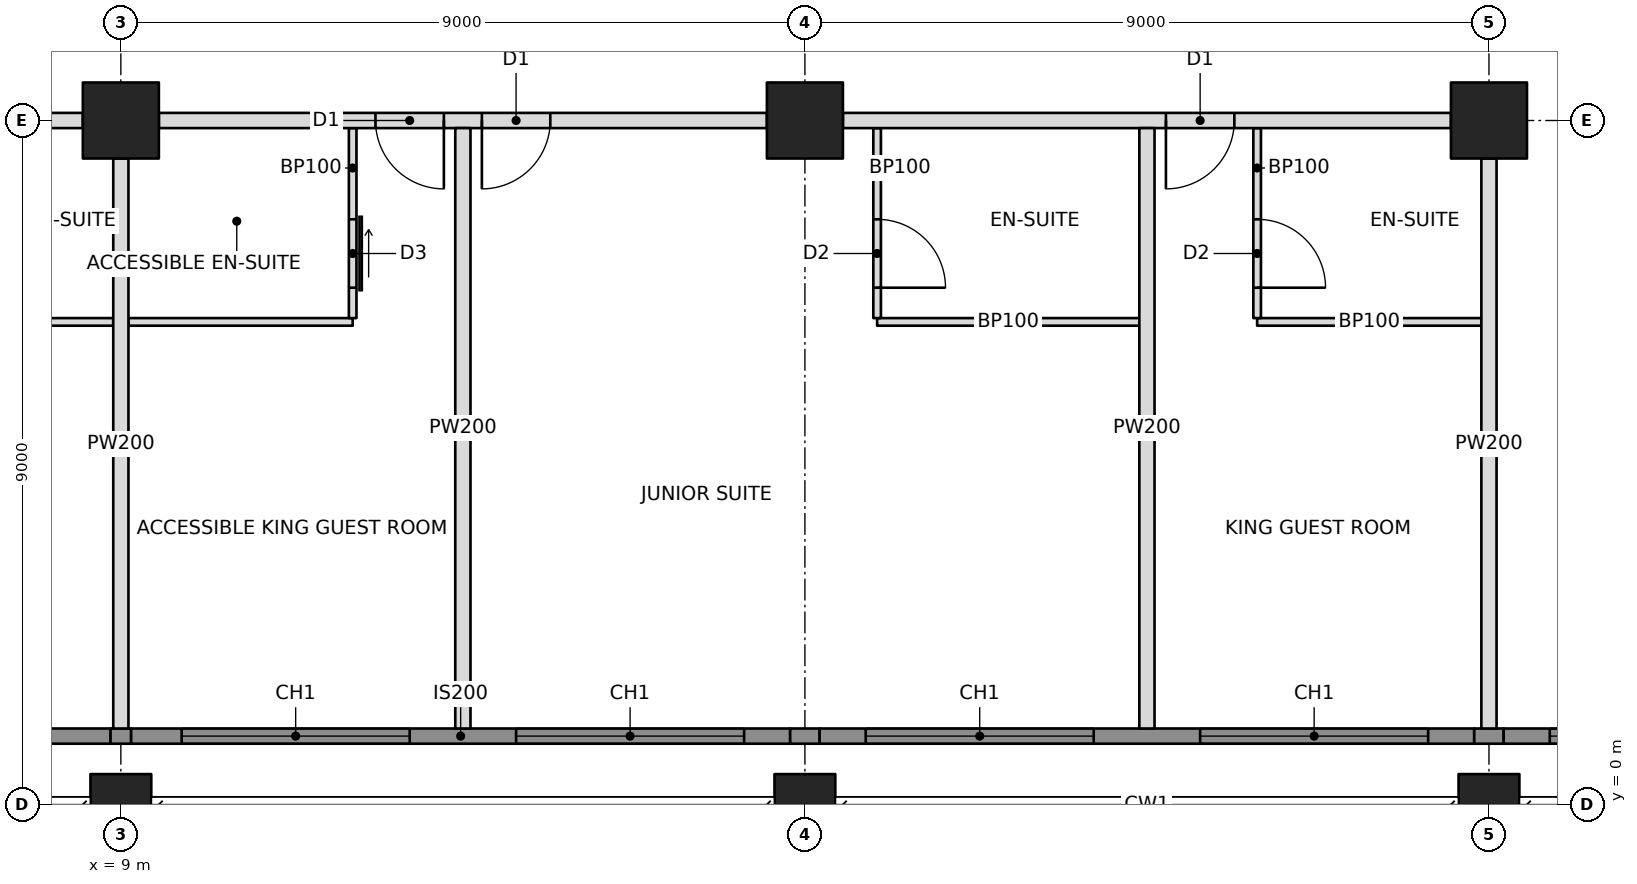
"""IFC4 building model, lengths in metres.
Left out: names, types, materials, properties, quantities, classifications, styles, units other than length and angle.
Written with IfcOpenShell. Run it as: python <this file> out.ifc"""

import sys

from ifc_helpers import new_model, si_unit, direction, frame, frame_2d, origin, origin_2d, place, context, subcontext, project, spatial, rectangle, hollow_rectangle, extrude, element, fill, save


model = new_model("IFC4")
c1 = context("Model", 3, precision=1e-05, world=origin(), true_north=direction((0.0, 1.0)))
c2 = subcontext(c1, "Body", "Model", "MODEL_VIEW")
j1 = project(units=[si_unit("LENGTHUNIT", "METRE"), si_unit("PLANEANGLEUNIT", "RADIAN")], contexts=[c1])
p1 = place(None, origin())
s1 = spatial("IfcSite", under=j1, at=p1, CompositionType="ELEMENT")
p2 = place(p1, origin())
s2 = spatial("IfcBuilding", under=s1, at=p2, CompositionType="ELEMENT")
p3 = place(p2, frame((0.0, 0.0, 97.6)))
s3 = spatial("IfcBuildingStorey", under=s2, at=p3, CompositionType="ELEMENT", Elevation=97.6)
p4 = place(p3, frame((9.0, 0.0, 0.0), z_axis=(0.0, 0.0, 1.0), x_axis=(1.0, 0.0, 0.0)))
e1 = element("IfcColumn", 1, at=p4, inside=s3, PredefinedType="COLUMN", context=c2, shape_type="SweptSolid", body=[
    extrude(hollow_rectangle(XDim=0.8, YDim=0.8, WallThickness=0.07, at=origin_2d()), origin(), (0.0, 0.0, 1.0), 3.4),
])
p5 = place(p3, frame((9.0, 9.0, 0.0), z_axis=(0.0, 0.0, 1.0), x_axis=(1.0, 0.0, 0.0)))
e2 = element("IfcColumn", 2, at=p5, inside=s3, PredefinedType="COLUMN", context=c2, shape_type="SweptSolid", body=[
    extrude(hollow_rectangle(XDim=1.0, YDim=1.0, WallThickness=0.1, at=origin_2d()), origin(), (0.0, 0.0, 1.0), 3.4),
])
p6 = place(p3, frame((18.0, 0.0, 0.0), z_axis=(0.0, 0.0, 1.0), x_axis=(1.0, 0.0, 0.0)))
e3 = element("IfcColumn", 3, at=p6, inside=s3, PredefinedType="COLUMN", context=c2, shape_type="SweptSolid", body=[
    extrude(hollow_rectangle(XDim=0.8, YDim=0.8, WallThickness=0.07, at=origin_2d()), origin(), (0.0, 0.0, 1.0), 3.4),
])
p7 = place(p3, frame((18.0, 9.0, 0.0), z_axis=(0.0, 0.0, 1.0), x_axis=(1.0, 0.0, 0.0)))
e4 = element("IfcColumn", 4, at=p7, inside=s3, PredefinedType="COLUMN", context=c2, shape_type="SweptSolid", body=[
    extrude(hollow_rectangle(XDim=1.0, YDim=1.0, WallThickness=0.1, at=origin_2d()), origin(), (0.0, 0.0, 1.0), 3.4),
])
p8 = place(p3, frame((27.0, 0.0, 0.0), z_axis=(0.0, 0.0, 1.0), x_axis=(1.0, 0.0, 0.0)))
e5 = element("IfcColumn", 5, at=p8, inside=s3, PredefinedType="COLUMN", context=c2, shape_type="SweptSolid", body=[
    extrude(hollow_rectangle(XDim=0.8, YDim=0.8, WallThickness=0.07, at=origin_2d()), origin(), (0.0, 0.0, 1.0), 3.4),
])
p9 = place(p3, frame((27.0, 9.0, 0.0), z_axis=(0.0, 0.0, 1.0), x_axis=(1.0, 0.0, 0.0)))
e6 = element("IfcColumn", 6, at=p9, inside=s3, PredefinedType="COLUMN", context=c2, shape_type="SweptSolid", body=[
    extrude(hollow_rectangle(XDim=1.0, YDim=1.0, WallThickness=0.1, at=origin_2d()), origin(), (0.0, 0.0, 1.0), 3.4),
])
p10 = place(p3, frame((3.0, 0.9, 0.0), z_axis=(0.0, 0.0, 1.0), x_axis=(1.0, 0.0, 0.0)))
e7 = element("IfcWall", 7, at=p10, inside=s3, PredefinedType="SOLIDWALL", context=c2, shape_type="SweptSolid", body=[
    extrude(rectangle(XDim=5.865, YDim=0.2, at=frame_2d((2.932, 0.0))), origin(), (0.0, 0.0, 1.0), 3.2),
])
p11 = place(p10, frame((1.45, 0.0, 0.6)))
e8 = element("IfcOpeningElement", 8, at=p11, cuts=e7, PredefinedType="OPENING", context=c2, shape_type="SweptSolid", body=[
    extrude(rectangle(XDim=3.0, YDim=2.2, at=frame_2d((1.5, 1.1))), frame((0.0, 0.11, 0.0), z_axis=(0.0, -1.0, 0.0), x_axis=(1.0, 0.0, 0.0)), (0.0, 0.0, 1.0), 0.22),
])
p12 = place(p3, frame((1.0, 9.0, 0.0), z_axis=(0.0, 0.0, 1.0), x_axis=(1.0, 0.0, 0.0)))
e9 = element("IfcWall", 9, at=p12, inside=s3, PredefinedType="PARTITIONING", context=c2, shape_type="SweptSolid", body=[
    extrude(rectangle(XDim=7.5, YDim=0.2, at=frame_2d((3.75, 0.0))), origin(), (0.0, 0.0, 1.0), 2.438),
])
p13 = place(p12, frame((0.25, 0.0, 0.0)))
e10 = element("IfcOpeningElement", 10, at=p13, cuts=e9, PredefinedType="OPENING", context=c2, shape_type="SweptSolid", body=[
    extrude(rectangle(XDim=0.9, YDim=2.1, at=frame_2d((0.45, 1.05))), frame((0.0, 0.11, 0.0), z_axis=(0.0, -1.0, 0.0), x_axis=(1.0, 0.0, 0.0)), (0.0, 0.0, 1.0), 0.22),
])
p14 = place(p3, frame((9.5, 9.0, 0.0), z_axis=(0.0, 0.0, 1.0), x_axis=(1.0, 0.0, 0.0)))
e11 = element("IfcWall", 11, at=p14, inside=s3, PredefinedType="PARTITIONING", context=c2, shape_type="SweptSolid", body=[
    extrude(rectangle(XDim=8.0, YDim=0.2, at=frame_2d((4.0, 0.0))), origin(), (0.0, 0.0, 1.0), 2.405),
])
p15 = place(p14, frame((2.85, 0.0, 0.0)))
e12 = element("IfcOpeningElement", 12, at=p15, cuts=e11, PredefinedType="OPENING", context=c2, shape_type="SweptSolid", body=[
    extrude(rectangle(XDim=0.9, YDim=2.1, at=frame_2d((0.45, 1.05))), frame((0.0, 0.11, 0.0), z_axis=(0.0, -1.0, 0.0), x_axis=(1.0, 0.0, 0.0)), (0.0, 0.0, 1.0), 0.22),
])
p16 = place(p14, frame((4.25, 0.0, 0.0)))
e13 = element("IfcOpeningElement", 13, at=p16, cuts=e11, PredefinedType="OPENING", context=c2, shape_type="SweptSolid", body=[
    extrude(rectangle(XDim=0.9, YDim=2.1, at=frame_2d((0.45, 1.05))), frame((0.0, 0.11, 0.0), z_axis=(0.0, -1.0, 0.0), x_axis=(1.0, 0.0, 0.0)), (0.0, 0.0, 1.0), 0.22),
])
p17 = place(p3, frame((18.5, 9.0, 0.0), z_axis=(0.0, 0.0, 1.0), x_axis=(1.0, 0.0, 0.0)))
e14 = element("IfcWall", 14, at=p17, inside=s3, PredefinedType="PARTITIONING", context=c2, shape_type="SweptSolid", body=[
    extrude(rectangle(XDim=8.0, YDim=0.2, at=frame_2d((4.0, 0.0))), origin(), (0.0, 0.0, 1.0), 2.405),
])
p18 = place(p17, frame((4.25, 0.0, 0.0)))
e15 = element("IfcOpeningElement", 15, at=p18, cuts=e14, PredefinedType="OPENING", context=c2, shape_type="SweptSolid", body=[
    extrude(rectangle(XDim=0.9, YDim=2.1, at=frame_2d((0.45, 1.05))), frame((0.0, 0.11, 0.0), z_axis=(0.0, -1.0, 0.0), x_axis=(1.0, 0.0, 0.0)), (0.0, 0.0, 1.0), 0.22),
])
p19 = place(p3, frame((9.0, 8.5, 0.0), z_axis=(0.0, 0.0, 1.0), x_axis=(0.0, -1.0, 0.0)))
e16 = element("IfcWall", 16, at=p19, inside=s3, PredefinedType="PARTITIONING", context=c2, shape_type="SweptSolid", body=[
    extrude(rectangle(XDim=7.5, YDim=0.2, at=frame_2d((3.75, 0.0))), origin(), (0.0, 0.0, 1.0), 2.438),
])
for number, where, z_axis, x_axis in (
    (17, (13.5, 8.9, 0.0), (0.0, 0.0, 1.0), (0.0, -1.0, 0.0)),
    (18, (22.5, 8.9, 0.0), (0.0, 0.0, 1.0), (0.0, -1.0, 0.0)),
):
    element("IfcWall", number, at=place(p3, frame(where, z_axis=z_axis, x_axis=x_axis)), inside=s3, PredefinedType="PARTITIONING", context=c2, shape_type="SweptSolid", body=[
        extrude(rectangle(XDim=7.9, YDim=0.2, at=frame_2d((3.95, 0.0))), origin(), (0.0, 0.0, 1.0), 2.404),
    ])
p20 = place(p3, frame((27.0, 8.5, 0.0), z_axis=(0.0, 0.0, 1.0), x_axis=(0.0, -1.0, 0.0)))
e19 = element("IfcWall", 19, at=p20, inside=s3, PredefinedType="PARTITIONING", context=c2, shape_type="SweptSolid", body=[
    extrude(rectangle(XDim=7.5, YDim=0.2, at=frame_2d((3.75, 0.0))), origin(), (0.0, 0.0, 1.0), 2.405),
])
p21 = place(p3, frame((5.45, 6.35, 0.0), z_axis=(0.0, 0.0, 1.0), x_axis=(1.0, 0.0, 0.0)))
e20 = element("IfcWall", 20, at=p21, inside=s3, PredefinedType="PARTITIONING", context=c2, shape_type="SweptSolid", body=[
    extrude(rectangle(XDim=3.45, YDim=0.1, at=frame_2d((1.725, 0.0))), origin(), (0.0, 0.0, 1.0), 2.438),
])
p22 = place(p3, frame((9.1, 6.35, 0.0), z_axis=(0.0, 0.0, 1.0), x_axis=(1.0, 0.0, 0.0)))
e21 = element("IfcWall", 21, at=p22, inside=s3, PredefinedType="PARTITIONING", context=c2, shape_type="SweptSolid", body=[
    extrude(rectangle(XDim=2.95, YDim=0.1, at=frame_2d((1.475, 0.0))), origin(), (0.0, 0.0, 1.0), 2.438),
])
p23 = place(p3, frame((12.05, 8.9, 0.0), z_axis=(0.0, 0.0, 1.0), x_axis=(0.0, -1.0, 0.0)))
e22 = element("IfcWall", 22, at=p23, inside=s3, PredefinedType="PARTITIONING", context=c2, shape_type="SweptSolid", body=[
    extrude(rectangle(XDim=2.5, YDim=0.1, at=frame_2d((1.25, 0.0))), origin(), (0.0, 0.0, 1.0), 2.404),
])
p24 = place(p23, frame((1.2, 0.0, 0.0)))
e23 = element("IfcOpeningElement", 23, at=p24, cuts=e22, PredefinedType="OPENING", context=c2, shape_type="SweptSolid", body=[
    extrude(rectangle(XDim=0.9, YDim=2.1, at=frame_2d((0.45, 1.05))), frame((0.0, 0.06, 0.0), z_axis=(0.0, -1.0, 0.0), x_axis=(1.0, 0.0, 0.0)), (0.0, 0.0, 1.0), 0.12),
])
p25 = place(p3, frame((18.95, 6.35, 0.0), z_axis=(0.0, 0.0, 1.0), x_axis=(1.0, 0.0, 0.0)))
e24 = element("IfcWall", 24, at=p25, inside=s3, PredefinedType="PARTITIONING", context=c2, shape_type="SweptSolid", body=[
    extrude(rectangle(XDim=3.45, YDim=0.1, at=frame_2d((1.725, 0.0))), origin(), (0.0, 0.0, 1.0), 3.2),
])
p26 = place(p3, frame((18.95, 8.9, 0.0), z_axis=(0.0, 0.0, 1.0), x_axis=(0.0, -1.0, 0.0)))
e25 = element("IfcWall", 25, at=p26, inside=s3, PredefinedType="PARTITIONING", context=c2, shape_type="SweptSolid", body=[
    extrude(rectangle(XDim=2.5, YDim=0.1, at=frame_2d((1.25, 0.0))), origin(), (0.0, 0.0, 1.0), 2.404),
])
p27 = place(p26, frame((1.2, 0.0, 0.0)))
e26 = element("IfcOpeningElement", 26, at=p27, cuts=e25, PredefinedType="OPENING", context=c2, shape_type="SweptSolid", body=[
    extrude(rectangle(XDim=0.9, YDim=2.1, at=frame_2d((0.45, 1.05))), frame((0.0, 0.06, 0.0), z_axis=(0.0, -1.0, 0.0), x_axis=(1.0, 0.0, 0.0)), (0.0, 0.0, 1.0), 0.12),
])
p28 = place(p3, frame((23.95, 6.35, 0.0), z_axis=(0.0, 0.0, 1.0), x_axis=(1.0, 0.0, 0.0)))
e27 = element("IfcWall", 27, at=p28, inside=s3, PredefinedType="PARTITIONING", context=c2, shape_type="SweptSolid", body=[
    extrude(rectangle(XDim=2.95, YDim=0.1, at=frame_2d((1.475, 0.0))), origin(), (0.0, 0.0, 1.0), 2.404),
])
p29 = place(p3, frame((23.95, 8.9, 0.0), z_axis=(0.0, 0.0, 1.0), x_axis=(0.0, -1.0, 0.0)))
e28 = element("IfcWall", 28, at=p29, inside=s3, PredefinedType="PARTITIONING", context=c2, shape_type="SweptSolid", body=[
    extrude(rectangle(XDim=2.5, YDim=0.1, at=frame_2d((1.25, 0.0))), origin(), (0.0, 0.0, 1.0), 2.404),
])
p30 = place(p29, frame((1.2, 0.0, 0.0)))
e29 = element("IfcOpeningElement", 29, at=p30, cuts=e28, PredefinedType="OPENING", context=c2, shape_type="SweptSolid", body=[
    extrude(rectangle(XDim=0.9, YDim=2.1, at=frame_2d((0.45, 1.05))), frame((0.0, 0.06, 0.0), z_axis=(0.0, -1.0, 0.0), x_axis=(1.0, 0.0, 0.0)), (0.0, 0.0, 1.0), 0.12),
])
p31 = place(p3, frame((8.865, 0.9, 0.0), z_axis=(0.0, 0.0, 1.0), x_axis=(1.0, 0.0, 0.0)))
e30 = element("IfcWall", 30, at=p31, inside=s3, PredefinedType="SOLIDWALL", context=c2, shape_type="SweptSolid", body=[
    extrude(rectangle(XDim=0.271, YDim=0.2, at=frame_2d((0.135, 0.0))), origin(), (0.0, 0.0, 1.0), 2.438),
])
p32 = place(p3, frame((9.135, 0.9, 0.0), z_axis=(0.0, 0.0, 1.0), x_axis=(1.0, 0.0, 0.0)))
e31 = element("IfcWall", 31, at=p32, inside=s3, PredefinedType="SOLIDWALL", context=c2, shape_type="SweptSolid", body=[
    extrude(rectangle(XDim=8.671, YDim=0.2, at=frame_2d((4.335, 0.0))), origin(), (0.0, 0.0, 1.0), 3.2),
])
p33 = place(p32, frame((0.665, 0.0, 0.6)))
e32 = element("IfcOpeningElement", 32, at=p33, cuts=e31, PredefinedType="OPENING", context=c2, shape_type="SweptSolid", body=[
    extrude(rectangle(XDim=3.0, YDim=2.2, at=frame_2d((1.5, 1.1))), frame((0.0, 0.11, 0.0), z_axis=(0.0, -1.0, 0.0), x_axis=(1.0, 0.0, 0.0)), (0.0, 0.0, 1.0), 0.22),
])
p34 = place(p32, frame((5.065, 0.0, 0.6)))
e33 = element("IfcOpeningElement", 33, at=p34, cuts=e31, PredefinedType="OPENING", context=c2, shape_type="SweptSolid", body=[
    extrude(rectangle(XDim=3.0, YDim=2.2, at=frame_2d((1.5, 1.1))), frame((0.0, 0.11, 0.0), z_axis=(0.0, -1.0, 0.0), x_axis=(1.0, 0.0, 0.0)), (0.0, 0.0, 1.0), 0.22),
])
p35 = place(p3, frame((17.806, 0.9, 0.0), z_axis=(0.0, 0.0, 1.0), x_axis=(1.0, 0.0, 0.0)))
e34 = element("IfcWall", 34, at=p35, inside=s3, PredefinedType="SOLIDWALL", context=c2, shape_type="SweptSolid", body=[
    extrude(rectangle(XDim=0.388, YDim=0.2, at=frame_2d((0.194, 0.0))), origin(), (0.0, 0.0, 1.0), 2.404),
])
p36 = place(p3, frame((18.194, 0.9, 0.0), z_axis=(0.0, 0.0, 1.0), x_axis=(1.0, 0.0, 0.0)))
e35 = element("IfcWall", 35, at=p36, inside=s3, PredefinedType="SOLIDWALL", context=c2, shape_type="SweptSolid", body=[
    extrude(rectangle(XDim=8.612, YDim=0.2, at=frame_2d((4.306, 0.0))), origin(), (0.0, 0.0, 1.0), 3.2),
])
p37 = place(p36, frame((0.606, 0.0, 0.6)))
e36 = element("IfcOpeningElement", 36, at=p37, cuts=e35, PredefinedType="OPENING", context=c2, shape_type="SweptSolid", body=[
    extrude(rectangle(XDim=3.0, YDim=2.2, at=frame_2d((1.5, 1.1))), frame((0.0, 0.11, 0.0), z_axis=(0.0, -1.0, 0.0), x_axis=(1.0, 0.0, 0.0)), (0.0, 0.0, 1.0), 0.22),
])
p38 = place(p36, frame((5.006, 0.0, 0.6)))
e37 = element("IfcOpeningElement", 37, at=p38, cuts=e35, PredefinedType="OPENING", context=c2, shape_type="SweptSolid", body=[
    extrude(rectangle(XDim=3.0, YDim=2.2, at=frame_2d((1.5, 1.1))), frame((0.0, 0.11, 0.0), z_axis=(0.0, -1.0, 0.0), x_axis=(1.0, 0.0, 0.0)), (0.0, 0.0, 1.0), 0.22),
])
p39 = place(p3, frame((26.806, 0.9, 0.0), z_axis=(0.0, 0.0, 1.0), x_axis=(1.0, 0.0, 0.0)))
e38 = element("IfcWall", 38, at=p39, inside=s3, PredefinedType="SOLIDWALL", context=c2, shape_type="SweptSolid", body=[
    extrude(rectangle(XDim=0.388, YDim=0.2, at=frame_2d((0.194, 0.0))), origin(), (0.0, 0.0, 1.0), 2.404),
])
p40 = place(p3, frame((27.194, 0.9, 0.0), z_axis=(0.0, 0.0, 1.0), x_axis=(1.0, 0.0, 0.0)))
e39 = element("IfcWall", 39, at=p40, inside=s3, PredefinedType="SOLIDWALL", context=c2, shape_type="SweptSolid", body=[
    extrude(rectangle(XDim=8.671, YDim=0.2, at=frame_2d((4.335, 0.0))), origin(), (0.0, 0.0, 1.0), 3.2),
])
p41 = place(p40, frame((0.606, 0.0, 0.6)))
e40 = element("IfcOpeningElement", 40, at=p41, cuts=e39, PredefinedType="OPENING", context=c2, shape_type="SweptSolid", body=[
    extrude(rectangle(XDim=3.0, YDim=2.2, at=frame_2d((1.5, 1.1))), frame((0.0, 0.11, 0.0), z_axis=(0.0, -1.0, 0.0), x_axis=(1.0, 0.0, 0.0)), (0.0, 0.0, 1.0), 0.22),
])
p42 = place(p40, frame((5.006, 0.0, 0.6)))
e41 = element("IfcOpeningElement", 41, at=p42, cuts=e39, PredefinedType="OPENING", context=c2, shape_type="SweptSolid", body=[
    extrude(rectangle(XDim=3.0, YDim=2.2, at=frame_2d((1.5, 1.1))), frame((0.0, 0.11, 0.0), z_axis=(0.0, -1.0, 0.0), x_axis=(1.0, 0.0, 0.0)), (0.0, 0.0, 1.0), 0.22),
])
p43 = place(p33, origin())
e42 = element("IfcWindow", 42, at=p43, inside=s3, PartitioningType="TRIPLE_PANEL_VERTICAL", PredefinedType="WINDOW", context=c2, shape_type="SweptSolid", body=[
    extrude(rectangle(XDim=3.0, YDim=2.2, at=frame_2d((1.5, 1.1))), frame((0.0, 0.03, 0.0), z_axis=(0.0, -1.0, 0.0), x_axis=(1.0, 0.0, 0.0)), (0.0, 0.0, 1.0), 0.06),
])
fill(e32, e42)
p44 = place(p34, origin())
e43 = element("IfcWindow", 43, at=p44, inside=s3, PartitioningType="TRIPLE_PANEL_VERTICAL", PredefinedType="WINDOW", context=c2, shape_type="SweptSolid", body=[
    extrude(rectangle(XDim=3.0, YDim=2.2, at=frame_2d((1.5, 1.1))), frame((0.0, 0.03, 0.0), z_axis=(0.0, -1.0, 0.0), x_axis=(1.0, 0.0, 0.0)), (0.0, 0.0, 1.0), 0.06),
])
fill(e33, e43)
p45 = place(p37, origin())
e44 = element("IfcWindow", 44, at=p45, inside=s3, PartitioningType="TRIPLE_PANEL_VERTICAL", PredefinedType="WINDOW", context=c2, shape_type="SweptSolid", body=[
    extrude(rectangle(XDim=3.0, YDim=2.2, at=frame_2d((1.5, 1.1))), frame((0.0, 0.03, 0.0), z_axis=(0.0, -1.0, 0.0), x_axis=(1.0, 0.0, 0.0)), (0.0, 0.0, 1.0), 0.06),
])
fill(e36, e44)
p46 = place(p38, origin())
e45 = element("IfcWindow", 45, at=p46, inside=s3, PartitioningType="TRIPLE_PANEL_VERTICAL", PredefinedType="WINDOW", context=c2, shape_type="SweptSolid", body=[
    extrude(rectangle(XDim=3.0, YDim=2.2, at=frame_2d((1.5, 1.1))), frame((0.0, 0.03, 0.0), z_axis=(0.0, -1.0, 0.0), x_axis=(1.0, 0.0, 0.0)), (0.0, 0.0, 1.0), 0.06),
])
fill(e37, e45)
p47 = place(p41, origin())
e46 = element("IfcWindow", 46, at=p47, inside=s3, PartitioningType="TRIPLE_PANEL_VERTICAL", PredefinedType="WINDOW", context=c2, shape_type="SweptSolid", body=[
    extrude(rectangle(XDim=3.0, YDim=2.2, at=frame_2d((1.5, 1.1))), frame((0.0, 0.03, 0.0), z_axis=(0.0, -1.0, 0.0), x_axis=(1.0, 0.0, 0.0)), (0.0, 0.0, 1.0), 0.06),
])
fill(e40, e46)
p48 = place(p24, origin())
e47 = element("IfcDoor", 47, at=p48, inside=s3, OperationType="SLIDING_TO_LEFT", PredefinedType="DOOR", context=c2, shape_type="SweptSolid", body=[
    extrude(rectangle(XDim=0.9, YDim=2.1, at=frame_2d((0.45, 1.05))), frame((0.0, 0.025, 0.0), z_axis=(0.0, -1.0, 0.0), x_axis=(1.0, 0.0, 0.0)), (0.0, 0.0, 1.0), 0.05),
])
fill(e23, e47)
p49 = place(p15, frame((0.9, 0.0, 0.0), z_axis=(0.0, 0.0, 1.0), x_axis=(-1.0, 0.0, 0.0)))
e48 = element("IfcDoor", 48, at=p49, inside=s3, OperationType="SINGLE_SWING_LEFT", PredefinedType="DOOR", context=c2, shape_type="SweptSolid", body=[
    extrude(rectangle(XDim=0.9, YDim=2.1, at=frame_2d((0.45, 1.05))), frame((0.0, 0.025, 0.0), z_axis=(0.0, -1.0, 0.0), x_axis=(1.0, 0.0, 0.0)), (0.0, 0.0, 1.0), 0.05),
])
fill(e12, e48)
p50 = place(p27, origin())
e49 = element("IfcDoor", 49, at=p50, inside=s3, OperationType="SINGLE_SWING_RIGHT", PredefinedType="DOOR", context=c2, shape_type="SweptSolid", body=[
    extrude(rectangle(XDim=0.9, YDim=2.1, at=frame_2d((0.45, 1.05))), frame((0.0, 0.025, 0.0), z_axis=(0.0, -1.0, 0.0), x_axis=(1.0, 0.0, 0.0)), (0.0, 0.0, 1.0), 0.05),
])
fill(e26, e49)
p51 = place(p16, frame((0.9, 0.0, 0.0), z_axis=(0.0, 0.0, 1.0), x_axis=(-1.0, 0.0, 0.0)))
e50 = element("IfcDoor", 50, at=p51, inside=s3, OperationType="SINGLE_SWING_RIGHT", PredefinedType="DOOR", context=c2, shape_type="SweptSolid", body=[
    extrude(rectangle(XDim=0.9, YDim=2.1, at=frame_2d((0.45, 1.05))), frame((0.0, 0.025, 0.0), z_axis=(0.0, -1.0, 0.0), x_axis=(1.0, 0.0, 0.0)), (0.0, 0.0, 1.0), 0.05),
])
fill(e13, e50)
p52 = place(p30, origin())
e51 = element("IfcDoor", 51, at=p52, inside=s3, OperationType="SINGLE_SWING_RIGHT", PredefinedType="DOOR", context=c2, shape_type="SweptSolid", body=[
    extrude(rectangle(XDim=0.9, YDim=2.1, at=frame_2d((0.45, 1.05))), frame((0.0, 0.025, 0.0), z_axis=(0.0, -1.0, 0.0), x_axis=(1.0, 0.0, 0.0)), (0.0, 0.0, 1.0), 0.05),
])
fill(e29, e51)
p53 = place(p18, frame((0.9, 0.0, 0.0), z_axis=(0.0, 0.0, 1.0), x_axis=(-1.0, 0.0, 0.0)))
e52 = element("IfcDoor", 52, at=p53, inside=s3, OperationType="SINGLE_SWING_RIGHT", PredefinedType="DOOR", context=c2, shape_type="SweptSolid", body=[
    extrude(rectangle(XDim=0.9, YDim=2.1, at=frame_2d((0.45, 1.05))), frame((0.0, 0.025, 0.0), z_axis=(0.0, -1.0, 0.0), x_axis=(1.0, 0.0, 0.0)), (0.0, 0.0, 1.0), 0.05),
])
fill(e15, e52)
save(model, sys.argv[1])
